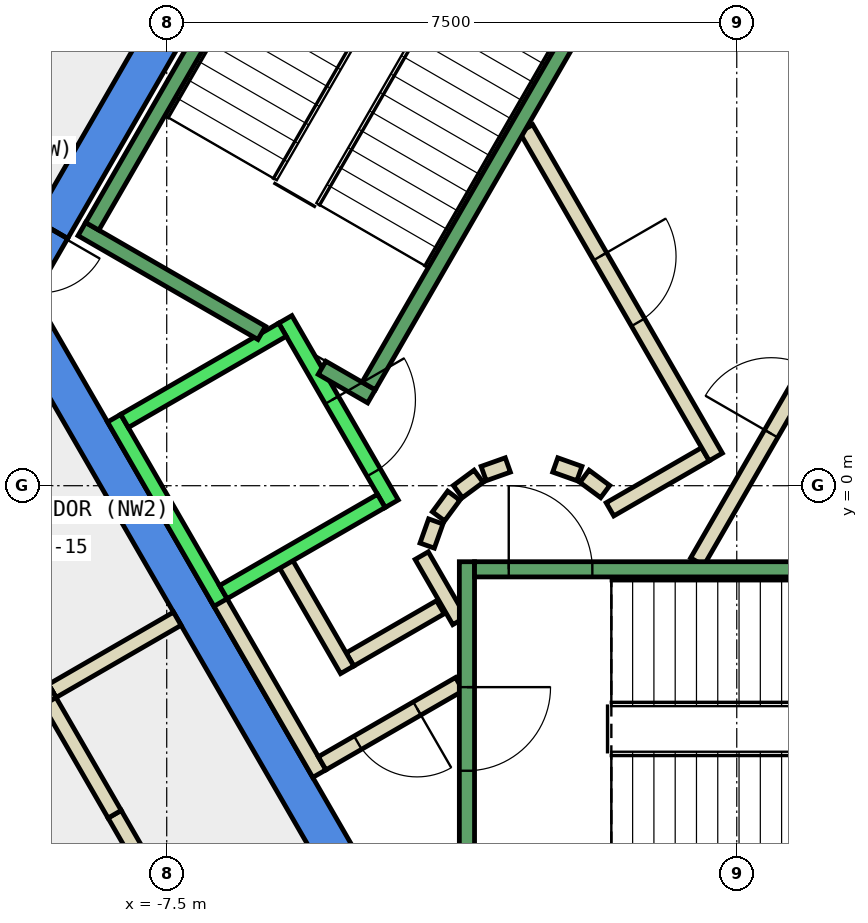
"""IFC4 building model, lengths in metres.
Left out: names, types, materials, properties, quantities, classifications, styles, units other than length and angle.
Written with IfcOpenShell. Run it as: python <this file> out.ifc"""

import sys

from ifc_helpers import new_model, si_unit, direction, frame, frame_2d, origin, place, context, subcontext, project, spatial, polyline, rectangle, outline, extrude, element, fill, save


model = new_model("IFC4")
c1 = context("Model", 3, precision=1e-05, world=origin(), true_north=direction((0.0, 1.0)))
c2 = subcontext(c1, "Body", "Model", "MODEL_VIEW")
j1 = project(units=[si_unit("LENGTHUNIT", "METRE"), si_unit("PLANEANGLEUNIT", "RADIAN")], contexts=[c1])
p1 = place(None, origin())
s1 = spatial("IfcSite", under=j1, at=p1, CompositionType="ELEMENT")
p2 = place(p1, origin())
s2 = spatial("IfcBuilding", under=s1, at=p2, CompositionType="ELEMENT")
p3 = place(p2, frame((0.0, 0.0, 353.9)))
s3 = spatial("IfcBuildingStorey", under=s2, at=p3, CompositionType="ELEMENT", Elevation=353.9)
p4 = place(p3, frame((0.0, 0.0, -0.35)))
e1 = element("IfcWall", 1, at=p4, inside=s3, PredefinedType="SHEAR", context=c2, shape_type="SweptSolid", body=[
    extrude(outline(polyline([(-9.236, 3.502), (-8.803, 3.253), (-4.619, 10.5), (-4.907, 11.0), (-9.236, 3.502)])), origin(), (0.0, 0.0, 1.0), 4.4),
])
p5 = place(p3, frame((0.0, 0.0, 3.6)))
e2 = element("IfcWall", 2, at=p5, inside=s3, PredefinedType="SHEAR", context=c2, shape_type="SweptSolid", body=[
    extrude(outline(polyline([(-9.7, 2.7), (-9.354, 2.5), (-9.238, 2.5), (-8.803, 3.253), (-9.236, 3.502), (-9.7, 2.7)])), origin(), (0.0, 0.0, 1.0), 0.45),
])
p6 = place(p3, frame((0.0, 0.0, -0.35)))
e3 = element("IfcWall", 3, at=p6, inside=s3, PredefinedType="SHEAR", context=c2, shape_type="SweptSolid", body=[
    extrude(outline(polyline([(-9.815, 2.5), (-4.907, -6.0), (-4.619, -5.5), (-9.238, 2.5), (-9.815, 2.5)])), origin(), (0.0, 0.0, 1.0), 4.4),
])
p7 = place(p3, frame((-3.9, -1.599, 0.0), z_axis=(0.0, 0.0, 1.0), x_axis=(-0.865969445389, -0.500096910261, 0.0)))
e4 = element("IfcWall", 4, at=p7, inside=s3, PredefinedType="PARTITIONING", context=c2, shape_type="SweptSolid", body=[
    extrude(rectangle(XDim=1.373, YDim=0.2, at=frame_2d((0.687, 0.0))), origin(), (0.0, 0.0, 1.0), 4.05),
])
p8 = place(p3, frame((-5.126, -2.422, 0.0), z_axis=(0.0, 0.0, 1.0), x_axis=(-0.500062241894, 0.865989465428, 0.0)))
e5 = element("IfcWall", 5, at=p8, inside=s3, PredefinedType="PARTITIONING", context=c2, shape_type="SweptSolid", body=[
    extrude(rectangle(XDim=1.7, YDim=0.2, at=frame_2d((0.85, 0.0))), origin(), (0.0, 0.0, 1.0), 4.05),
])
p9 = place(p3, frame((-5.492, -3.788, 0.0), z_axis=(0.0, 0.0, 1.0), x_axis=(-0.500008949224, 0.866020236886, 0.0)))
e6 = element("IfcWall", 6, at=p9, inside=s3, PredefinedType="PARTITIONING", context=c2, shape_type="SweptSolid", body=[
    extrude(rectangle(XDim=2.68, YDim=0.2, at=frame_2d((1.34, 0.0))), origin(), (0.0, 0.0, 1.0), 4.05),
])
p10 = place(p3, frame((-4.145, -0.92, 0.0), z_axis=(0.0, 0.0, 1.0), x_axis=(0.499743786207, -0.866173278362, 0.0)))
e7 = element("IfcWall", 7, at=p10, inside=s3, PredefinedType="PARTITIONING", context=c2, shape_type="SweptSolid", body=[
    extrude(rectangle(XDim=0.991, YDim=0.2, at=frame_2d((0.495, 0.0))), origin(), (0.0, 0.0, 1.0), 4.05),
])
p11 = place(p3, frame((-3.65, -2.61, 0.0), z_axis=(0.0, 0.0, 1.0), x_axis=(-0.866072462134, -0.499918483688, 0.0)))
e8 = element("IfcWall", 8, at=p11, inside=s3, PredefinedType="PARTITIONING", context=c2, shape_type="SweptSolid", body=[
    extrude(rectangle(XDim=2.084, YDim=0.2, at=frame_2d((1.042, 0.0))), origin(), (0.0, 0.0, 1.0), 4.05),
])
p12 = place(p11, frame((0.642, 0.0, 0.0)))
e9 = element("IfcOpeningElement", 9, at=p12, cuts=e8, PredefinedType="OPENING", context=c2, shape_type="SweptSolid", body=[
    extrude(rectangle(XDim=0.9, YDim=2.1, at=frame_2d((0.45, 1.05))), frame((0.0, 0.11, 0.0), z_axis=(0.0, -1.0, 0.0), x_axis=(1.0, 0.0, 0.0)), (0.0, 0.0, 1.0), 0.22),
])
p13 = place(p3, frame((-0.52, -1.0, 0.0), z_axis=(0.0, 0.0, 1.0), x_axis=(0.50011622646, 0.865958290007, 0.0)))
e10 = element("IfcWall", 10, at=p13, inside=s3, PredefinedType="PARTITIONING", context=c2, shape_type="SweptSolid", body=[
    extrude(rectangle(XDim=4.991, YDim=0.2, at=frame_2d((2.496, 0.0))), origin(), (0.0, 0.0, 1.0), 4.05),
])
p14 = place(p13, frame((1.945, 0.0, 0.0)))
e11 = element("IfcOpeningElement", 11, at=p14, cuts=e10, PredefinedType="OPENING", context=c2, shape_type="SweptSolid", body=[
    extrude(rectangle(XDim=1.0, YDim=2.1, at=frame_2d((0.5, 1.05))), frame((0.0, 0.11, 0.0), z_axis=(0.0, -1.0, 0.0), x_axis=(1.0, 0.0, 0.0)), (0.0, 0.0, 1.0), 0.22),
])
p15 = place(p3, frame((-0.412, 0.414, 0.0), z_axis=(0.0, 0.0, 1.0), x_axis=(-0.866017369001, -0.500013916395, 0.0)))
e12 = element("IfcWall", 12, at=p15, inside=s3, PredefinedType="PARTITIONING", context=c2, shape_type="SweptSolid", body=[
    extrude(rectangle(XDim=1.45, YDim=0.2, at=frame_2d((0.725, 0.0))), origin(), (0.0, 0.0, 1.0), 4.05),
])
p16 = place(p3, frame((-1.731, -0.077, 0.0), z_axis=(0.0, 0.0, 1.0), x_axis=(-0.804311165252, 0.594208338422, 0.0)))
e13 = element("IfcWall", 13, at=p16, inside=s3, PredefinedType="PARTITIONING", context=c2, shape_type="SweptSolid", body=[
    extrude(rectangle(XDim=0.338, YDim=0.2, at=frame_2d((0.169, 0.0))), origin(), (0.0, 0.0, 1.0), 4.05),
])
p17 = place(p3, frame((-2.07, 0.16, 0.0), z_axis=(0.0, 0.0, 1.0), x_axis=(-0.942199461132, 0.335052496547, 0.0)))
e14 = element("IfcWall", 14, at=p17, inside=s3, PredefinedType="PARTITIONING", context=c2, shape_type="SweptSolid", body=[
    extrude(rectangle(XDim=0.337, YDim=0.2, at=frame_2d((0.169, 0.0))), origin(), (0.0, 0.0, 1.0), 4.05),
])
p18 = place(p3, frame((-3.012, 0.273, 0.0), z_axis=(0.0, 0.0, 1.0), x_axis=(-0.942280615813, -0.334824194261, 0.0)))
e15 = element("IfcWall", 15, at=p18, inside=s3, PredefinedType="PARTITIONING", context=c2, shape_type="SweptSolid", body=[
    extrude(rectangle(XDim=0.338, YDim=0.2, at=frame_2d((0.169, 0.0))), origin(), (0.0, 0.0, 1.0), 4.05),
])
p19 = place(p3, frame((-3.397, 0.124, 0.0), z_axis=(0.0, 0.0, 1.0), x_axis=(-0.804311165252, -0.594208338422, 0.0)))
e16 = element("IfcWall", 16, at=p19, inside=s3, PredefinedType="PARTITIONING", context=c2, shape_type="SweptSolid", body=[
    extrude(rectangle(XDim=0.338, YDim=0.2, at=frame_2d((0.169, 0.0))), origin(), (0.0, 0.0, 1.0), 4.05),
])
p20 = place(p3, frame((-3.723, -0.131, 0.0), z_axis=(0.0, 0.0, 1.0), x_axis=(-0.594675113454, -0.803966112121, 0.0)))
e17 = element("IfcWall", 17, at=p20, inside=s3, PredefinedType="PARTITIONING", context=c2, shape_type="SweptSolid", body=[
    extrude(rectangle(XDim=0.338, YDim=0.2, at=frame_2d((0.169, 0.0))), origin(), (0.0, 0.0, 1.0), 4.05),
])
p21 = place(p3, frame((-3.96, -0.47, 0.0), z_axis=(0.0, 0.0, 1.0), x_axis=(-0.334824194261, -0.942280615813, 0.0)))
e18 = element("IfcWall", 18, at=p21, inside=s3, PredefinedType="PARTITIONING", context=c2, shape_type="SweptSolid", body=[
    extrude(rectangle(XDim=0.338, YDim=0.2, at=frame_2d((0.169, 0.0))), origin(), (0.0, 0.0, 1.0), 4.05),
])
p22 = place(p3, frame((-2.771, 4.7, 0.0), z_axis=(0.0, 0.0, 1.0), x_axis=(0.499969479948, -0.866043023828, 0.0)))
e19 = element("IfcWall", 19, at=p22, inside=s3, PredefinedType="PARTITIONING", context=c2, shape_type="SweptSolid", body=[
    extrude(rectangle(XDim=4.99, YDim=0.2, at=frame_2d((2.495, 0.0))), origin(), (0.0, 0.0, 1.0), 4.05),
])
p23 = place(p22, frame((1.945, 0.0, 0.0)))
e20 = element("IfcOpeningElement", 20, at=p23, cuts=e19, PredefinedType="OPENING", context=c2, shape_type="SweptSolid", body=[
    extrude(rectangle(XDim=1.0, YDim=2.1, at=frame_2d((0.5, 1.05))), frame((0.0, 0.11, 0.0), z_axis=(0.0, -1.0, 0.0), x_axis=(1.0, 0.0, 0.0)), (0.0, 0.0, 1.0), 0.22),
])
p24 = place(p3, frame((-9.006, -2.7, 0.0), z_axis=(0.0, 0.0, 1.0), x_axis=(0.865980106173, 0.500078449558, 0.0)))
e21 = element("IfcWall", 21, at=p24, inside=s3, PredefinedType="PARTITIONING", context=c2, shape_type="SweptSolid", body=[
    extrude(rectangle(XDim=1.9, YDim=0.2, at=frame_2d((0.95, 0.0))), origin(), (0.0, 0.0, 1.0), 4.05),
])
p25 = place(p3, frame((-7.835, -4.928, 0.0), z_axis=(0.0, 0.0, 1.0), x_axis=(-0.500265973451, 0.865871789474, 0.0)))
e22 = element("IfcWall", 22, at=p25, inside=s3, PredefinedType="PARTITIONING", context=c2, shape_type="SweptSolid", body=[
    extrude(rectangle(XDim=0.7, YDim=0.2, at=frame_2d((0.35, 0.0))), origin(), (0.0, 0.0, 1.0), 1.95),
])
p26 = place(p3, frame((-8.185, -4.322, 0.0), z_axis=(0.0, 0.0, 1.0), x_axis=(-0.500145398563, 0.865941441609, 0.0)))
e23 = element("IfcWall", 23, at=p26, inside=s3, PredefinedType="PARTITIONING", context=c2, shape_type="SweptSolid", body=[
    extrude(rectangle(XDim=1.815, YDim=0.2, at=frame_2d((0.908, 0.0))), origin(), (0.0, 0.0, 1.0), 4.05),
])
p27 = place(p3, frame((-16.43, -6.986, 0.0), z_axis=(0.0, 0.0, 1.0), x_axis=(0.866026229868, 0.499998569178, 0.0)))
e24 = element("IfcWall", 24, at=p27, inside=s3, PredefinedType="PARTITIONING", context=c2, shape_type="SweptSolid", body=[
    extrude(rectangle(XDim=8.572, YDim=0.2, at=frame_2d((4.286, 0.0))), origin(), (0.0, 0.0, 1.0), 4.05),
])
p28 = place(p3, frame((-5.94, 2.188, 0.0), z_axis=(0.0, 0.0, 1.0), x_axis=(0.49994636267, -0.866056369097, 0.0)))
e25 = element("IfcWall", 25, at=p28, inside=s3, PredefinedType="STANDARD", context=c2, shape_type="SweptSolid", body=[
    extrude(rectangle(XDim=2.8, YDim=0.2, at=frame_2d((1.4, 0.0))), origin(), (0.0, 0.0, 1.0), 4.05),
])
p29 = place(p28, frame((1.225, 0.0, 0.0)))
e26 = element("IfcOpeningElement", 26, at=p29, cuts=e25, PredefinedType="OPENING", context=c2, shape_type="SweptSolid", body=[
    extrude(rectangle(XDim=1.1, YDim=2.1, at=frame_2d((0.55, 1.05))), frame((0.0, 0.11, 0.0), z_axis=(0.0, -1.0, 0.0), x_axis=(1.0, 0.0, 0.0)), (0.0, 0.0, 1.0), 0.22),
])
p30 = place(p3, frame((-8.192, 0.888, 0.0), z_axis=(0.0, 0.0, 1.0), x_axis=(0.49994636267, -0.866056369097, 0.0)))
e27 = element("IfcWall", 27, at=p30, inside=s3, PredefinedType="STANDARD", context=c2, shape_type="SweptSolid", body=[
    extrude(rectangle(XDim=2.8, YDim=0.2, at=frame_2d((1.4, 0.0))), origin(), (0.0, 0.0, 1.0), 4.05),
])
for number, where, z_axis, x_axis in (
    (28, (-5.977, 2.052, 0.0), (0.0, 0.0, 1.0), (-0.866, -0.5, 0.0)),
    (29, (-4.677, -0.2, 0.0), (0.0, 0.0, 1.0), (-0.866, -0.5, 0.0)),
):
    element("IfcWall", number, at=place(p3, frame(where, z_axis=z_axis, x_axis=x_axis)), inside=s3, PredefinedType="STANDARD", context=c2, shape_type="SweptSolid", body=[
        extrude(rectangle(XDim=2.399, YDim=0.2, at=frame_2d((1.2, 0.0))), origin(), (0.0, 0.0, 1.0), 4.05),
    ])
p31 = place(p3, frame((-3.55, -1.0, 0.0), z_axis=(0.0, 0.0, 1.0), x_axis=(0.0, -1.0, 0.0)))
e30 = element("IfcWall", 30, at=p31, inside=s3, PredefinedType="STANDARD", context=c2, shape_type="SweptSolid", body=[
    extrude(rectangle(XDim=4.4, YDim=0.2, at=frame_2d((2.2, 0.0))), origin(), (0.0, 0.0, 1.0), 4.05),
])
p32 = place(p31, frame((1.65, 0.0, 0.0)))
e31 = element("IfcOpeningElement", 31, at=p32, cuts=e30, PredefinedType="OPENING", context=c2, shape_type="SweptSolid", body=[
    extrude(rectangle(XDim=1.1, YDim=2.2, at=frame_2d((0.55, 1.1))), frame((0.0, 0.11, 0.0), z_axis=(0.0, -1.0, 0.0), x_axis=(1.0, 0.0, 0.0)), (0.0, 0.0, 1.0), 0.22),
])
p33 = place(p3, frame((-3.45, -1.1, 0.0), z_axis=(0.0, 0.0, 1.0), x_axis=(1.0, 0.0, 0.0)))
e32 = element("IfcWall", 32, at=p33, inside=s3, PredefinedType="STANDARD", context=c2, shape_type="SweptSolid", body=[
    extrude(rectangle(XDim=6.9, YDim=0.2, at=frame_2d((3.45, 0.0))), origin(), (0.0, 0.0, 1.0), 4.05),
])
p34 = place(p33, frame((0.45, 0.0, 0.0)))
e33 = element("IfcOpeningElement", 33, at=p34, cuts=e32, PredefinedType="OPENING", context=c2, shape_type="SweptSolid", body=[
    extrude(rectangle(XDim=1.1, YDim=2.2, at=frame_2d((0.55, 1.1))), frame((0.0, 0.11, 0.0), z_axis=(0.0, -1.0, 0.0), x_axis=(1.0, 0.0, 0.0)), (0.0, 0.0, 1.0), 0.22),
])
p35 = place(p3, frame((-6.25, 2.01, 0.0), z_axis=(0.0, 0.0, 1.0), x_axis=(-0.86611865017, 0.499838457731, 0.0)))
e34 = element("IfcWall", 34, at=p35, inside=s3, PredefinedType="STANDARD", context=c2, shape_type="SweptSolid", body=[
    extrude(rectangle(XDim=2.733, YDim=0.2, at=frame_2d((1.366, 0.0))), origin(), (0.0, 0.0, 1.0), 4.05),
])
p36 = place(p3, frame((-4.806, 1.176, 0.0), z_axis=(0.0, 0.0, 1.0), x_axis=(-0.866558586415, 0.499075361355, 0.0)))
e35 = element("IfcWall", 35, at=p36, inside=s3, PredefinedType="STANDARD", context=c2, shape_type="SweptSolid", body=[
    extrude(rectangle(XDim=0.751, YDim=0.2, at=frame_2d((0.376, 0.0))), origin(), (0.0, 0.0, 1.0), 4.05),
])
p37 = place(p3, frame((-1.393, 7.288, 0.0), z_axis=(0.0, 0.0, 1.0), x_axis=(-0.499963383562, -0.866046543262, 0.0)))
e36 = element("IfcWall", 36, at=p37, inside=s3, PredefinedType="STANDARD", context=c2, shape_type="SweptSolid", body=[
    extrude(rectangle(XDim=6.9, YDim=0.2, at=frame_2d((3.45, 0.0))), origin(), (0.0, 0.0, 1.0), 4.05),
])
p38 = place(p37, frame((0.45, 0.0, 0.0)))
e37 = element("IfcOpeningElement", 37, at=p38, cuts=e36, PredefinedType="OPENING", context=c2, shape_type="SweptSolid", body=[
    extrude(rectangle(XDim=1.1, YDim=2.2, at=frame_2d((0.55, 1.1))), frame((0.0, 0.11, 0.0), z_axis=(0.0, -1.0, 0.0), x_axis=(1.0, 0.0, 0.0)), (0.0, 0.0, 1.0), 0.22),
])
p39 = place(p3, frame((-5.03, 9.388, 0.0), z_axis=(0.0, 0.0, 1.0), x_axis=(-0.499978703459, -0.866037698999, 0.0)))
e38 = element("IfcWall", 38, at=p39, inside=s3, PredefinedType="STANDARD", context=c2, shape_type="SweptSolid", body=[
    extrude(rectangle(XDim=6.9, YDim=0.2, at=frame_2d((3.45, 0.0))), origin(), (0.0, 0.0, 1.0), 4.05),
])
p40 = place(p14, origin())
e39 = element("IfcDoor", 39, at=p40, inside=s3, OperationType="SINGLE_SWING_LEFT", PredefinedType="DOOR", context=c2, shape_type="SweptSolid", body=[
    extrude(rectangle(XDim=1.0, YDim=2.1, at=frame_2d((0.5, 1.05))), frame((0.0, 0.025, 0.0), z_axis=(0.0, -1.0, 0.0), x_axis=(1.0, 0.0, 0.0)), (0.0, 0.0, 1.0), 0.05),
])
fill(e11, e39)
p41 = place(p23, origin())
e40 = element("IfcDoor", 40, at=p41, inside=s3, OperationType="SINGLE_SWING_RIGHT", PredefinedType="DOOR", context=c2, shape_type="SweptSolid", body=[
    extrude(rectangle(XDim=1.0, YDim=2.1, at=frame_2d((0.5, 1.05))), frame((0.0, 0.025, 0.0), z_axis=(0.0, -1.0, 0.0), x_axis=(1.0, 0.0, 0.0)), (0.0, 0.0, 1.0), 0.05),
])
fill(e20, e40)
p42 = place(p12, origin())
e41 = element("IfcDoor", 41, at=p42, inside=s3, OperationType="SINGLE_SWING_LEFT", PredefinedType="DOOR", context=c2, shape_type="SweptSolid", body=[
    extrude(rectangle(XDim=0.9, YDim=2.1, at=frame_2d((0.45, 1.05))), frame((0.0, 0.025, 0.0), z_axis=(0.0, -1.0, 0.0), x_axis=(1.0, 0.0, 0.0)), (0.0, 0.0, 1.0), 0.05),
])
fill(e9, e41)
p43 = place(p29, origin())
e42 = element("IfcDoor", 42, at=p43, inside=s3, OperationType="SLIDING_TO_LEFT", PredefinedType="DOOR", context=c2, shape_type="SweptSolid", body=[
    extrude(rectangle(XDim=1.1, YDim=2.1, at=frame_2d((0.55, 1.05))), frame((0.0, 0.025, 0.0), z_axis=(0.0, -1.0, 0.0), x_axis=(1.0, 0.0, 0.0)), (0.0, 0.0, 1.0), 0.05),
])
fill(e26, e42)
p44 = place(p34, origin())
e43 = element("IfcDoor", 43, at=p44, inside=s3, OperationType="SINGLE_SWING_LEFT", PredefinedType="DOOR", context=c2, shape_type="SweptSolid", body=[
    extrude(rectangle(XDim=1.1, YDim=2.2, at=frame_2d((0.55, 1.1))), frame((0.0, 0.025, 0.0), z_axis=(0.0, -1.0, 0.0), x_axis=(1.0, 0.0, 0.0)), (0.0, 0.0, 1.0), 0.05),
])
fill(e33, e43)
p45 = place(p32, origin())
e44 = element("IfcDoor", 44, at=p45, inside=s3, OperationType="SINGLE_SWING_LEFT", PredefinedType="DOOR", context=c2, shape_type="SweptSolid", body=[
    extrude(rectangle(XDim=1.1, YDim=2.2, at=frame_2d((0.55, 1.1))), frame((0.0, 0.025, 0.0), z_axis=(0.0, -1.0, 0.0), x_axis=(1.0, 0.0, 0.0)), (0.0, 0.0, 1.0), 0.05),
])
fill(e31, e44)
save(model, sys.argv[1])
